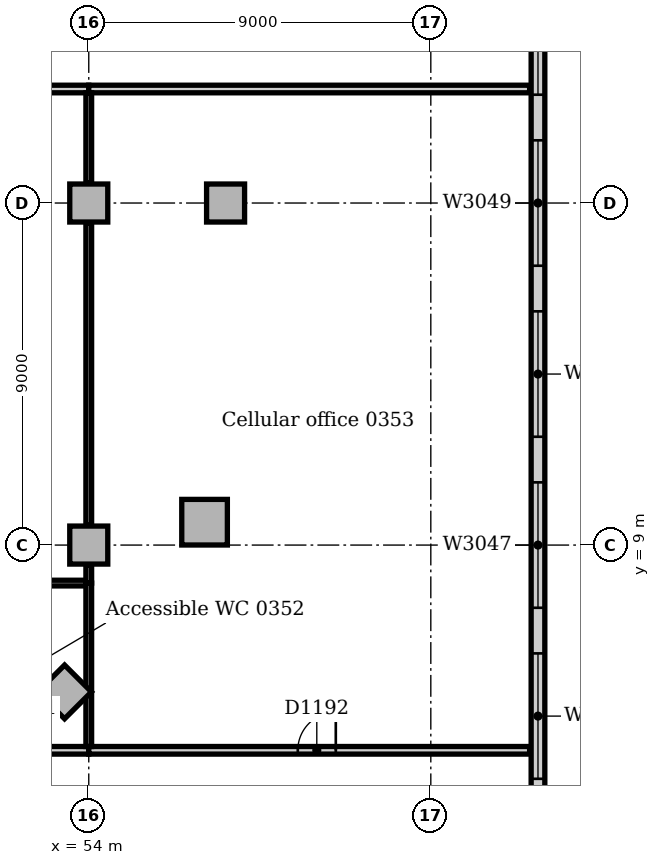
"""IFC4 building model, lengths in metres.
Left out: names, types, materials, properties, quantities, classifications, styles, units other than length and angle.
Written with IfcOpenShell. Run it as: python <this file> out.ifc"""

import sys

from ifc_helpers import new_model, si_unit, direction, frame, frame_2d, origin, origin_2d, place, context, subcontext, project, spatial, rectangle, extrude, element, fill, save


model = new_model("IFC4")
c1 = context("Model", 3, precision=1e-05, world=origin(), true_north=direction((0.0, 1.0)))
c2 = subcontext(c1, "Body", "Model", "MODEL_VIEW")
j1 = project(units=[si_unit("LENGTHUNIT", "METRE"), si_unit("PLANEANGLEUNIT", "RADIAN")], contexts=[c1])
p1 = place(None, origin())
s1 = spatial("IfcSite", under=j1, at=p1, CompositionType="ELEMENT")
p2 = place(p1, origin())
s2 = spatial("IfcBuilding", under=s1, at=p2, CompositionType="ELEMENT")
p3 = place(p2, frame((0.0, 0.0, 16.0)))
s3 = spatial("IfcBuildingStorey", under=s2, at=p3, CompositionType="ELEMENT", Elevation=16.0)
p4 = place(p3, frame((57.047, 9.602, 0.0), z_axis=(0.0, 0.0, 1.0), x_axis=(1.0, 0.0, 0.0)))
e1 = element("IfcColumn", 1, at=p4, inside=s3, PredefinedType="COLUMN", context=c2, shape_type="SweptSolid", body=[
    extrude(rectangle(XDim=1.2, YDim=1.2, at=origin_2d()), origin(), (0.0, 0.0, 1.0), 4.7),
])
for number, where, z_axis, x_axis in (
    (2, (53.364, 5.136, 0.0), (0.0, 0.0, 1.0), (0.707, 0.707, 0.0)),
    (3, (57.6, 18.0, 0.0), (0.0, 0.0, 1.0), (1.0, 0.0, 0.0)),
    (4, (54.0, 9.0, 0.0), (0.0, 0.0, 1.0), (1.0, 0.0, 0.0)),
    (5, (54.0, 18.0, 0.0), (0.0, 0.0, 1.0), (1.0, 0.0, 0.0)),
):
    element("IfcColumn", number, at=place(p3, frame(where, z_axis=z_axis, x_axis=x_axis)), inside=s3, PredefinedType="COLUMN", context=c2, shape_type="SweptSolid", body=[
        extrude(rectangle(XDim=1.0, YDim=1.0, at=origin_2d()), origin(), (0.0, 0.0, 1.0), 4.7),
    ])
p5 = place(p3, frame((65.82, -9.0, 0.0), z_axis=(0.0, 0.0, 1.0), x_axis=(0.0, 1.0, 0.0)))
e6 = element("IfcWall", 6, at=p5, inside=s3, PredefinedType="STANDARD", context=c2, shape_type="SweptSolid", body=[
    extrude(rectangle(XDim=63.0, YDim=0.36, at=frame_2d((31.5, 0.0))), origin(), (0.0, 0.0, 1.0), 4.7),
])
p6 = place(p5, frame((2.85, 0.0, 0.9)))
e7 = element("IfcOpeningElement", 7, at=p6, cuts=e6, PredefinedType="OPENING", context=c2, shape_type="SweptSolid", body=[
    extrude(rectangle(XDim=3.3, YDim=2.4, at=frame_2d((1.65, 1.2))), frame((0.0, 0.19, 0.0), z_axis=(0.0, -1.0, 0.0), x_axis=(1.0, 0.0, 0.0)), (0.0, 0.0, 1.0), 0.38),
])
p7 = place(p5, frame((7.35, 0.0, 0.9)))
e8 = element("IfcOpeningElement", 8, at=p7, cuts=e6, PredefinedType="OPENING", context=c2, shape_type="SweptSolid", body=[
    extrude(rectangle(XDim=3.3, YDim=2.4, at=frame_2d((1.65, 1.2))), frame((0.0, 0.19, 0.0), z_axis=(0.0, -1.0, 0.0), x_axis=(1.0, 0.0, 0.0)), (0.0, 0.0, 1.0), 0.38),
])
p8 = place(p5, frame((11.85, 0.0, 0.9)))
e9 = element("IfcOpeningElement", 9, at=p8, cuts=e6, PredefinedType="OPENING", context=c2, shape_type="SweptSolid", body=[
    extrude(rectangle(XDim=3.3, YDim=2.4, at=frame_2d((1.65, 1.2))), frame((0.0, 0.19, 0.0), z_axis=(0.0, -1.0, 0.0), x_axis=(1.0, 0.0, 0.0)), (0.0, 0.0, 1.0), 0.38),
])
p9 = place(p5, frame((16.35, 0.0, 0.9)))
e10 = element("IfcOpeningElement", 10, at=p9, cuts=e6, PredefinedType="OPENING", context=c2, shape_type="SweptSolid", body=[
    extrude(rectangle(XDim=3.3, YDim=2.4, at=frame_2d((1.65, 1.2))), frame((0.0, 0.19, 0.0), z_axis=(0.0, -1.0, 0.0), x_axis=(1.0, 0.0, 0.0)), (0.0, 0.0, 1.0), 0.38),
])
p10 = place(p5, frame((20.85, 0.0, 0.9)))
e11 = element("IfcOpeningElement", 11, at=p10, cuts=e6, PredefinedType="OPENING", context=c2, shape_type="SweptSolid", body=[
    extrude(rectangle(XDim=3.3, YDim=2.4, at=frame_2d((1.65, 1.2))), frame((0.0, 0.19, 0.0), z_axis=(0.0, -1.0, 0.0), x_axis=(1.0, 0.0, 0.0)), (0.0, 0.0, 1.0), 0.38),
])
p11 = place(p5, frame((25.35, 0.0, 0.9)))
e12 = element("IfcOpeningElement", 12, at=p11, cuts=e6, PredefinedType="OPENING", context=c2, shape_type="SweptSolid", body=[
    extrude(rectangle(XDim=3.3, YDim=2.4, at=frame_2d((1.65, 1.2))), frame((0.0, 0.19, 0.0), z_axis=(0.0, -1.0, 0.0), x_axis=(1.0, 0.0, 0.0)), (0.0, 0.0, 1.0), 0.38),
])
p12 = place(p5, frame((29.85, 0.0, 0.9)))
e13 = element("IfcOpeningElement", 13, at=p12, cuts=e6, PredefinedType="OPENING", context=c2, shape_type="SweptSolid", body=[
    extrude(rectangle(XDim=3.3, YDim=2.4, at=frame_2d((1.65, 1.2))), frame((0.0, 0.19, 0.0), z_axis=(0.0, -1.0, 0.0), x_axis=(1.0, 0.0, 0.0)), (0.0, 0.0, 1.0), 0.38),
])
p13 = place(p5, frame((34.35, 0.0, 0.9)))
e14 = element("IfcOpeningElement", 14, at=p13, cuts=e6, PredefinedType="OPENING", context=c2, shape_type="SweptSolid", body=[
    extrude(rectangle(XDim=3.3, YDim=2.4, at=frame_2d((1.65, 1.2))), frame((0.0, 0.19, 0.0), z_axis=(0.0, -1.0, 0.0), x_axis=(1.0, 0.0, 0.0)), (0.0, 0.0, 1.0), 0.38),
])
p14 = place(p5, frame((38.85, 0.0, 0.9)))
e15 = element("IfcOpeningElement", 15, at=p14, cuts=e6, PredefinedType="OPENING", context=c2, shape_type="SweptSolid", body=[
    extrude(rectangle(XDim=3.3, YDim=2.4, at=frame_2d((1.65, 1.2))), frame((0.0, 0.19, 0.0), z_axis=(0.0, -1.0, 0.0), x_axis=(1.0, 0.0, 0.0)), (0.0, 0.0, 1.0), 0.38),
])
p15 = place(p5, frame((43.35, 0.0, 0.9)))
e16 = element("IfcOpeningElement", 16, at=p15, cuts=e6, PredefinedType="OPENING", context=c2, shape_type="SweptSolid", body=[
    extrude(rectangle(XDim=3.3, YDim=2.4, at=frame_2d((1.65, 1.2))), frame((0.0, 0.19, 0.0), z_axis=(0.0, -1.0, 0.0), x_axis=(1.0, 0.0, 0.0)), (0.0, 0.0, 1.0), 0.38),
])
p16 = place(p5, frame((47.85, 0.0, 0.9)))
e17 = element("IfcOpeningElement", 17, at=p16, cuts=e6, PredefinedType="OPENING", context=c2, shape_type="SweptSolid", body=[
    extrude(rectangle(XDim=3.3, YDim=2.4, at=frame_2d((1.65, 1.2))), frame((0.0, 0.19, 0.0), z_axis=(0.0, -1.0, 0.0), x_axis=(1.0, 0.0, 0.0)), (0.0, 0.0, 1.0), 0.38),
])
p17 = place(p5, frame((52.35, 0.0, 0.9)))
e18 = element("IfcOpeningElement", 18, at=p17, cuts=e6, PredefinedType="OPENING", context=c2, shape_type="SweptSolid", body=[
    extrude(rectangle(XDim=3.3, YDim=2.4, at=frame_2d((1.65, 1.2))), frame((0.0, 0.19, 0.0), z_axis=(0.0, -1.0, 0.0), x_axis=(1.0, 0.0, 0.0)), (0.0, 0.0, 1.0), 0.38),
])
p18 = place(p5, frame((56.85, 0.0, 0.9)))
e19 = element("IfcOpeningElement", 19, at=p18, cuts=e6, PredefinedType="OPENING", context=c2, shape_type="SweptSolid", body=[
    extrude(rectangle(XDim=3.3, YDim=2.4, at=frame_2d((1.65, 1.2))), frame((0.0, 0.19, 0.0), z_axis=(0.0, -1.0, 0.0), x_axis=(1.0, 0.0, 0.0)), (0.0, 0.0, 1.0), 0.38),
])
p19 = place(p3, frame((51.0, 3.6, 0.0), z_axis=(0.0, 0.0, 1.0), x_axis=(1.0, 0.0, 0.0)))
e20 = element("IfcWall", 20, at=p19, inside=s3, PredefinedType="PARTITIONING", context=c2, shape_type="SweptSolid", body=[
    extrude(rectangle(XDim=3.0, YDim=0.2, at=frame_2d((1.5, 0.0))), origin(), (0.0, 0.0, 1.0), 4.7),
])
p20 = place(p19, frame((0.8, 0.0, 0.0)))
e21 = element("IfcOpeningElement", 21, at=p20, cuts=e20, PredefinedType="OPENING", context=c2, shape_type="SweptSolid", body=[
    extrude(rectangle(XDim=1.0, YDim=2.1, at=frame_2d((0.5, 1.05))), frame((0.0, 0.11, 0.0), z_axis=(0.0, -1.0, 0.0), x_axis=(1.0, 0.0, 0.0)), (0.0, 0.0, 1.0), 0.22),
])
p21 = place(p3, frame((54.0, 3.6, 0.0), z_axis=(0.0, 0.0, 1.0), x_axis=(1.0, 0.0, 0.0)))
e22 = element("IfcWall", 22, at=p21, inside=s3, PredefinedType="PARTITIONING", context=c2, shape_type="SweptSolid", body=[
    extrude(rectangle(XDim=11.6, YDim=0.2, at=frame_2d((5.8, 0.0))), origin(), (0.0, 0.0, 1.0), 4.7),
])
p22 = place(p21, frame((5.5, 0.0, 0.0)))
e23 = element("IfcOpeningElement", 23, at=p22, cuts=e22, PredefinedType="OPENING", context=c2, shape_type="SweptSolid", body=[
    extrude(rectangle(XDim=1.0, YDim=2.1, at=frame_2d((0.5, 1.05))), frame((0.0, 0.11, 0.0), z_axis=(0.0, -1.0, 0.0), x_axis=(1.0, 0.0, 0.0)), (0.0, 0.0, 1.0), 0.22),
])
p23 = place(p3, frame((45.0, 21.0, 0.0), z_axis=(0.0, 0.0, 1.0), x_axis=(1.0, 0.0, 0.0)))
e24 = element("IfcWall", 24, at=p23, inside=s3, PredefinedType="PARTITIONING", context=c2, shape_type="SweptSolid", body=[
    extrude(rectangle(XDim=9.0, YDim=0.2, at=frame_2d((4.5, 0.0))), origin(), (0.0, 0.0, 1.0), 4.7),
])
p24 = place(p23, frame((0.3, 0.0, 0.0)))
e25 = element("IfcOpeningElement", 25, at=p24, cuts=e24, PredefinedType="OPENING", context=c2, shape_type="SweptSolid", body=[
    extrude(rectangle(XDim=1.8, YDim=2.1, at=frame_2d((0.9, 1.05))), frame((0.0, 0.11, 0.0), z_axis=(0.0, -1.0, 0.0), x_axis=(1.0, 0.0, 0.0)), (0.0, 0.0, 1.0), 0.22),
])
p25 = place(p3, frame((54.0, 21.0, 0.0), z_axis=(0.0, 0.0, 1.0), x_axis=(1.0, 0.0, 0.0)))
e26 = element("IfcWall", 26, at=p25, inside=s3, PredefinedType="PARTITIONING", context=c2, shape_type="SweptSolid", body=[
    extrude(rectangle(XDim=11.6, YDim=0.2, at=frame_2d((5.8, 0.0))), origin(), (0.0, 0.0, 1.0), 4.7),
])
p26 = place(p3, frame((51.0, 8.0, 0.0), z_axis=(0.0, 0.0, 1.0), x_axis=(1.0, 0.0, 0.0)))
e27 = element("IfcWall", 27, at=p26, inside=s3, PredefinedType="PARTITIONING", context=c2, shape_type="SweptSolid", body=[
    extrude(rectangle(XDim=2.925, YDim=0.15, at=frame_2d((1.462, 0.0))), origin(), (0.0, 0.0, 1.0), 4.7),
])
p27 = place(p3, frame((54.0, 8.0, 0.0), z_axis=(0.0, 0.0, 1.0), x_axis=(0.0, 1.0, 0.0)))
e28 = element("IfcWall", 28, at=p27, inside=s3, PredefinedType="PARTITIONING", context=c2, shape_type="SweptSolid", body=[
    extrude(rectangle(XDim=0.48, YDim=0.15, at=frame_2d((0.24, 0.0))), origin(), (0.0, 0.0, 1.0), 4.7),
])
p28 = place(p3, frame((54.0, 9.52, 0.0), z_axis=(0.0, 0.0, 1.0), x_axis=(0.0, 1.0, 0.0)))
e29 = element("IfcWall", 29, at=p28, inside=s3, PredefinedType="PARTITIONING", context=c2, shape_type="SweptSolid", body=[
    extrude(rectangle(XDim=7.96, YDim=0.15, at=frame_2d((3.98, 0.0))), origin(), (0.0, 0.0, 1.0), 4.7),
])
p29 = place(p3, frame((54.0, 18.52, 0.0), z_axis=(0.0, 0.0, 1.0), x_axis=(0.0, 1.0, 0.0)))
e30 = element("IfcWall", 30, at=p29, inside=s3, PredefinedType="PARTITIONING", context=c2, shape_type="SweptSolid", body=[
    extrude(rectangle(XDim=2.38, YDim=0.15, at=frame_2d((1.19, 0.0))), origin(), (0.0, 0.0, 1.0), 4.7),
])
p30 = place(p3, frame((54.0, 3.7, 0.0), z_axis=(0.0, 0.0, 1.0), x_axis=(0.0, 1.0, 0.0)))
e31 = element("IfcWall", 31, at=p30, inside=s3, PredefinedType="PARTITIONING", context=c2, shape_type="SweptSolid", body=[
    extrude(rectangle(XDim=4.3, YDim=0.15, at=frame_2d((2.15, 0.0))), origin(), (0.0, 0.0, 1.0), 4.7),
])
p31 = place(p8, origin())
e32 = element("IfcWindow", 32, at=p31, inside=s3, PartitioningType="SINGLE_PANEL", PredefinedType="WINDOW", context=c2, shape_type="SweptSolid", body=[
    extrude(rectangle(XDim=3.3, YDim=2.4, at=frame_2d((1.65, 1.2))), frame((0.0, 0.13, 0.0), z_axis=(0.0, -1.0, 0.0), x_axis=(1.0, 0.0, 0.0)), (0.0, 0.0, 1.0), 0.06),
])
fill(e9, e32)
p32 = place(p9, origin())
e33 = element("IfcWindow", 33, at=p32, inside=s3, PartitioningType="SINGLE_PANEL", PredefinedType="WINDOW", context=c2, shape_type="SweptSolid", body=[
    extrude(rectangle(XDim=3.3, YDim=2.4, at=frame_2d((1.65, 1.2))), frame((0.0, 0.13, 0.0), z_axis=(0.0, -1.0, 0.0), x_axis=(1.0, 0.0, 0.0)), (0.0, 0.0, 1.0), 0.06),
])
fill(e10, e33)
p33 = place(p10, origin())
e34 = element("IfcWindow", 34, at=p33, inside=s3, PartitioningType="SINGLE_PANEL", PredefinedType="WINDOW", context=c2, shape_type="SweptSolid", body=[
    extrude(rectangle(XDim=3.3, YDim=2.4, at=frame_2d((1.65, 1.2))), frame((0.0, 0.13, 0.0), z_axis=(0.0, -1.0, 0.0), x_axis=(1.0, 0.0, 0.0)), (0.0, 0.0, 1.0), 0.06),
])
fill(e11, e34)
p34 = place(p11, origin())
e35 = element("IfcWindow", 35, at=p34, inside=s3, PartitioningType="SINGLE_PANEL", PredefinedType="WINDOW", context=c2, shape_type="SweptSolid", body=[
    extrude(rectangle(XDim=3.3, YDim=2.4, at=frame_2d((1.65, 1.2))), frame((0.0, 0.13, 0.0), z_axis=(0.0, -1.0, 0.0), x_axis=(1.0, 0.0, 0.0)), (0.0, 0.0, 1.0), 0.06),
])
fill(e12, e35)
p35 = place(p12, origin())
e36 = element("IfcWindow", 36, at=p35, inside=s3, PartitioningType="SINGLE_PANEL", PredefinedType="WINDOW", context=c2, shape_type="SweptSolid", body=[
    extrude(rectangle(XDim=3.3, YDim=2.4, at=frame_2d((1.65, 1.2))), frame((0.0, 0.13, 0.0), z_axis=(0.0, -1.0, 0.0), x_axis=(1.0, 0.0, 0.0)), (0.0, 0.0, 1.0), 0.06),
])
fill(e13, e36)
p36 = place(p22, origin())
e37 = element("IfcDoor", 37, at=p36, inside=s3, OperationType="SINGLE_SWING_RIGHT", PredefinedType="DOOR", context=c2, shape_type="SweptSolid", body=[
    extrude(rectangle(XDim=1.0, YDim=2.1, at=frame_2d((0.5, 1.05))), frame((0.0, 0.025, 0.0), z_axis=(0.0, -1.0, 0.0), x_axis=(1.0, 0.0, 0.0)), (0.0, 0.0, 1.0), 0.05),
])
fill(e23, e37)
save(model, sys.argv[1])
